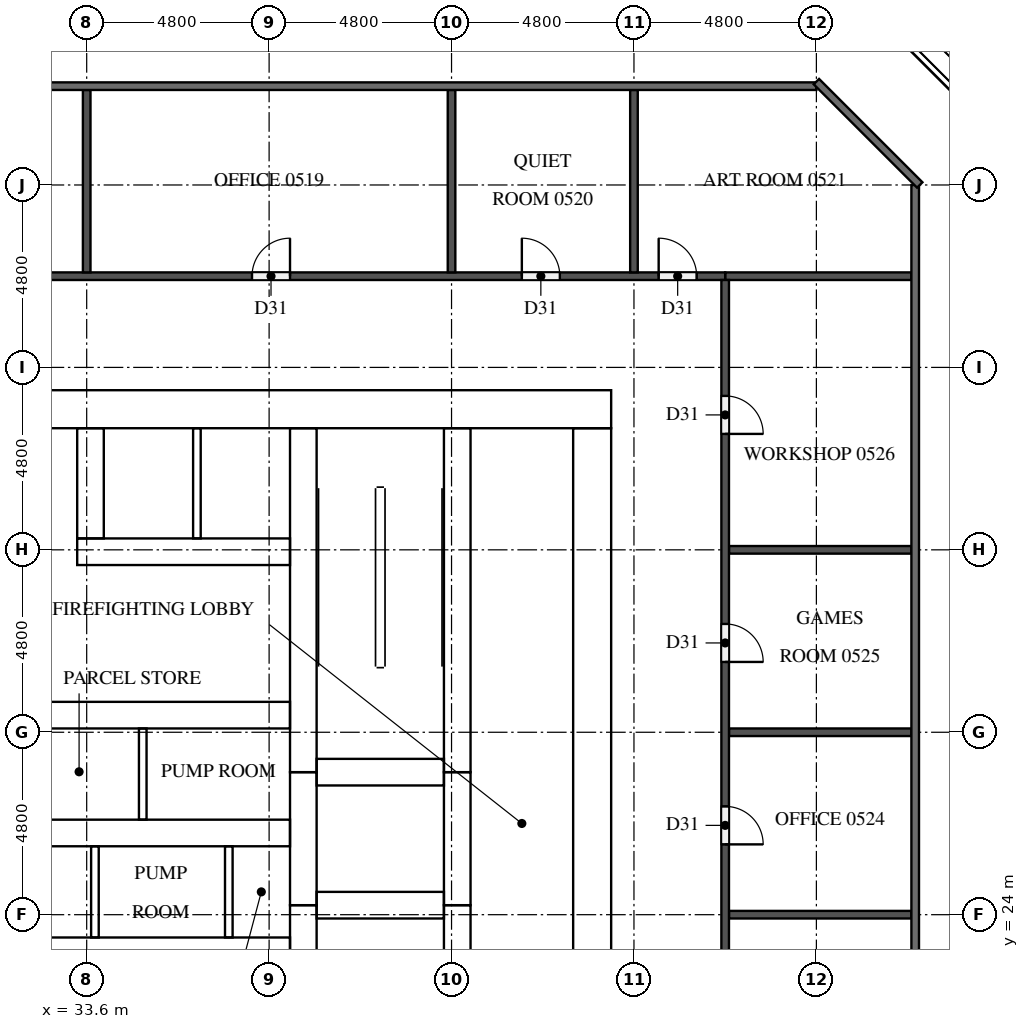
"""IFC4 building model, lengths in metres.
Left out: names, types, materials, properties, quantities, classifications, styles, units other than length and angle.
Written with IfcOpenShell. Run it as: python <this file> out.ifc"""

import sys

from ifc_helpers import new_model, si_unit, direction, frame, frame_2d, origin, place, context, subcontext, project, spatial, rectangle, extrude, element, fill, save


model = new_model("IFC4")
c1 = context("Model", 3, precision=1e-05, world=origin(), true_north=direction((0.0, 1.0)))
c2 = subcontext(c1, "Body", "Model", "MODEL_VIEW")
j1 = project(units=[si_unit("LENGTHUNIT", "METRE"), si_unit("PLANEANGLEUNIT", "RADIAN")], contexts=[c1])
p1 = place(None, origin())
s1 = spatial("IfcSite", under=j1, at=p1, CompositionType="ELEMENT")
p2 = place(p1, origin())
s2 = spatial("IfcBuilding", under=s1, at=p2, CompositionType="ELEMENT")
p3 = place(p2, frame((0.0, 0.0, 24.0)))
s3 = spatial("IfcBuildingStorey", under=s2, at=p3, CompositionType="ELEMENT", Elevation=24.0)
p4 = place(p3, frame((15.0, 37.3, 0.0), z_axis=(0.0, 0.0, 1.0), x_axis=(1.0, 0.0, 0.0)))
e1 = element("IfcWall", 1, at=p4, inside=s3, PredefinedType="SHEAR", context=c2, shape_type="SweptSolid", body=[
    extrude(rectangle(XDim=32.4, YDim=1.0, at=frame_2d((16.2, 0.0))), origin(), (0.0, 0.0, 1.0), 5.1),
])
p5 = place(p4, frame((15.3, 0.0, 0.0)))
e2 = element("IfcOpeningElement", 2, at=p5, cuts=e1, PredefinedType="OPENING", context=c2, shape_type="SweptSolid", body=[
    extrude(rectangle(XDim=1.8, YDim=2.1, at=frame_2d((0.9, 1.05))), frame((0.0, 0.51, 0.0), z_axis=(0.0, -1.0, 0.0), x_axis=(1.0, 0.0, 0.0)), (0.0, 0.0, 1.0), 1.02),
])
p6 = place(p4, frame((1.766, 0.0, 0.0)))
e3 = element("IfcOpeningElement", 3, at=p6, cuts=e1, PredefinedType="OPENING", context=c2, shape_type="SweptSolid", body=[
    extrude(rectangle(XDim=1.0, YDim=2.1, at=frame_2d((0.5, 1.05))), frame((0.0, 0.51, 0.0), z_axis=(0.0, -1.0, 0.0), x_axis=(1.0, 0.0, 0.0)), (0.0, 0.0, 1.0), 1.02),
])
p7 = place(p4, frame((5.241, 0.0, 0.0)))
e4 = element("IfcOpeningElement", 4, at=p7, cuts=e1, PredefinedType="OPENING", context=c2, shape_type="SweptSolid", body=[
    extrude(rectangle(XDim=1.0, YDim=2.1, at=frame_2d((0.5, 1.05))), frame((0.0, 0.51, 0.0), z_axis=(0.0, -1.0, 0.0), x_axis=(1.0, 0.0, 0.0)), (0.0, 0.0, 1.0), 1.02),
])
p8 = place(p3, frame((46.9, 16.0, 0.0), z_axis=(0.0, 0.0, 1.0), x_axis=(0.0, 1.0, 0.0)))
e5 = element("IfcWall", 5, at=p8, inside=s3, PredefinedType="SHEAR", context=c2, shape_type="SweptSolid", body=[
    extrude(rectangle(XDim=20.8, YDim=1.0, at=frame_2d((10.4, 0.0))), origin(), (0.0, 0.0, 1.0), 5.1),
])
p9 = place(p8, frame((10.1, 0.0, 0.0)))
e6 = element("IfcOpeningElement", 6, at=p9, cuts=e5, PredefinedType="OPENING", context=c2, shape_type="SweptSolid", body=[
    extrude(rectangle(XDim=1.2, YDim=2.1, at=frame_2d((0.6, 1.05))), frame((0.0, 0.51, 0.0), z_axis=(0.0, -1.0, 0.0), x_axis=(1.0, 0.0, 0.0)), (0.0, 0.0, 1.0), 1.02),
])
p10 = place(p3, frame((39.3, 16.0, 0.0), z_axis=(0.0, 0.0, 1.0), x_axis=(0.0, 1.0, 0.0)))
e7 = element("IfcWall", 7, at=p10, inside=s3, PredefinedType="SHEAR", context=c2, shape_type="SweptSolid", body=[
    extrude(rectangle(XDim=8.25, YDim=0.7, at=frame_2d((4.125, 0.0))), origin(), (0.0, 0.0, 1.0), 5.1),
])
p11 = place(p3, frame((39.3, 24.25, 0.0), z_axis=(0.0, 0.0, 1.0), x_axis=(0.0, 1.0, 0.0)))
e8 = element("IfcWall", 8, at=p11, inside=s3, PredefinedType="SHEAR", context=c2, shape_type="SweptSolid", body=[
    extrude(rectangle(XDim=3.5, YDim=0.7, at=frame_2d((1.75, 0.0))), origin(), (0.0, 0.0, 1.0), 5.1),
])
p12 = place(p3, frame((39.3, 27.75, 0.0), z_axis=(0.0, 0.0, 1.0), x_axis=(0.0, 1.0, 0.0)))
e9 = element("IfcWall", 9, at=p12, inside=s3, PredefinedType="SHEAR", context=c2, shape_type="SweptSolid", body=[
    extrude(rectangle(XDim=9.05, YDim=0.7, at=frame_2d((4.525, 0.0))), origin(), (0.0, 0.0, 1.0), 5.1),
])
p13 = place(p3, frame((43.35, 16.0, 0.0), z_axis=(0.0, 0.0, 1.0), x_axis=(0.0, 1.0, 0.0)))
e10 = element("IfcWall", 10, at=p13, inside=s3, PredefinedType="SHEAR", context=c2, shape_type="SweptSolid", body=[
    extrude(rectangle(XDim=8.25, YDim=0.7, at=frame_2d((4.125, 0.0))), origin(), (0.0, 0.0, 1.0), 5.1),
])
p14 = place(p13, frame((0.2, 0.0, 0.0)))
e11 = element("IfcOpeningElement", 11, at=p14, cuts=e10, PredefinedType="OPENING", context=c2, shape_type="SweptSolid", body=[
    extrude(rectangle(XDim=1.2, YDim=2.1, at=frame_2d((0.6, 1.05))), frame((0.0, 0.36, 0.0), z_axis=(0.0, -1.0, 0.0), x_axis=(1.0, 0.0, 0.0)), (0.0, 0.0, 1.0), 0.72),
])
p15 = place(p3, frame((43.35, 24.25, 0.0), z_axis=(0.0, 0.0, 1.0), x_axis=(0.0, 1.0, 0.0)))
e12 = element("IfcWall", 12, at=p15, inside=s3, PredefinedType="SHEAR", context=c2, shape_type="SweptSolid", body=[
    extrude(rectangle(XDim=3.5, YDim=0.7, at=frame_2d((1.75, 0.0))), origin(), (0.0, 0.0, 1.0), 5.1),
])
p16 = place(p15, frame((1.2, 0.0, 0.0)))
e13 = element("IfcOpeningElement", 13, at=p16, cuts=e12, PredefinedType="OPENING", context=c2, shape_type="SweptSolid", body=[
    extrude(rectangle(XDim=1.1, YDim=2.1, at=frame_2d((0.55, 1.05))), frame((0.0, 0.36, 0.0), z_axis=(0.0, -1.0, 0.0), x_axis=(1.0, 0.0, 0.0)), (0.0, 0.0, 1.0), 0.72),
])
p17 = place(p3, frame((43.35, 27.75, 0.0), z_axis=(0.0, 0.0, 1.0), x_axis=(0.0, 1.0, 0.0)))
e14 = element("IfcWall", 14, at=p17, inside=s3, PredefinedType="SHEAR", context=c2, shape_type="SweptSolid", body=[
    extrude(rectangle(XDim=9.05, YDim=0.7, at=frame_2d((4.525, 0.0))), origin(), (0.0, 0.0, 1.0), 5.1),
])
p18 = place(p17, frame((7.65, 0.0, 0.0)))
e15 = element("IfcOpeningElement", 15, at=p18, cuts=e14, PredefinedType="OPENING", context=c2, shape_type="SweptSolid", body=[
    extrude(rectangle(XDim=1.2, YDim=2.1, at=frame_2d((0.6, 1.05))), frame((0.0, 0.36, 0.0), z_axis=(0.0, -1.0, 0.0), x_axis=(1.0, 0.0, 0.0)), (0.0, 0.0, 1.0), 0.72),
])
for number, where, z_axis, x_axis in (
    (16, (39.65, 24.25, 0.0), (0.0, 0.0, 1.0), (1.0, 0.0, 0.0)),
    (17, (39.65, 27.75, 0.0), (0.0, 0.0, 1.0), (1.0, 0.0, 0.0)),
):
    element("IfcWall", number, at=place(p3, frame(where, z_axis=z_axis, x_axis=x_axis)), inside=s3, PredefinedType="SHEAR", context=c2, shape_type="SweptSolid", body=[
        extrude(rectangle(XDim=3.35, YDim=0.7, at=frame_2d((1.675, 0.0))), origin(), (0.0, 0.0, 1.0), 5.1),
    ])
p19 = place(p3, frame((23.45, 23.05, 0.0), z_axis=(0.0, 0.0, 1.0), x_axis=(1.0, 0.0, 0.0)))
e18 = element("IfcWall", 18, at=p19, inside=s3, PredefinedType="SHEAR", context=c2, shape_type="SweptSolid", body=[
    extrude(rectangle(XDim=15.5, YDim=0.7, at=frame_2d((7.75, 0.0))), origin(), (0.0, 0.0, 1.0), 5.1),
])
p20 = place(p19, frame((0.658, 0.0, 0.0)))
e19 = element("IfcOpeningElement", 19, at=p20, cuts=e18, PredefinedType="OPENING", context=c2, shape_type="SweptSolid", body=[
    extrude(rectangle(XDim=1.1, YDim=2.1, at=frame_2d((0.55, 1.05))), frame((0.0, 0.36, 0.0), z_axis=(0.0, -1.0, 0.0), x_axis=(1.0, 0.0, 0.0)), (0.0, 0.0, 1.0), 0.72),
])
p21 = place(p19, frame((3.275, 0.0, 0.0)))
e20 = element("IfcOpeningElement", 20, at=p21, cuts=e18, PredefinedType="OPENING", context=c2, shape_type="SweptSolid", body=[
    extrude(rectangle(XDim=1.1, YDim=2.1, at=frame_2d((0.55, 1.05))), frame((0.0, 0.36, 0.0), z_axis=(0.0, -1.0, 0.0), x_axis=(1.0, 0.0, 0.0)), (0.0, 0.0, 1.0), 0.72),
])
p22 = place(p19, frame((11.628, 0.0, 0.0)))
e21 = element("IfcOpeningElement", 21, at=p22, cuts=e18, PredefinedType="OPENING", context=c2, shape_type="SweptSolid", body=[
    extrude(rectangle(XDim=1.0, YDim=2.1, at=frame_2d((0.5, 1.05))), frame((0.0, 0.36, 0.0), z_axis=(0.0, -1.0, 0.0), x_axis=(1.0, 0.0, 0.0)), (0.0, 0.0, 1.0), 0.72),
])
p23 = place(p19, frame((14.245, 0.0, 0.0)))
e22 = element("IfcOpeningElement", 22, at=p23, cuts=e18, PredefinedType="OPENING", context=c2, shape_type="SweptSolid", body=[
    extrude(rectangle(XDim=1.0, YDim=2.1, at=frame_2d((0.5, 1.05))), frame((0.0, 0.36, 0.0), z_axis=(0.0, -1.0, 0.0), x_axis=(1.0, 0.0, 0.0)), (0.0, 0.0, 1.0), 0.72),
])
p24 = place(p3, frame((23.45, 26.15, 0.0), z_axis=(0.0, 0.0, 1.0), x_axis=(1.0, 0.0, 0.0)))
e23 = element("IfcWall", 23, at=p24, inside=s3, PredefinedType="SHEAR", context=c2, shape_type="SweptSolid", body=[
    extrude(rectangle(XDim=15.5, YDim=0.7, at=frame_2d((7.75, 0.0))), origin(), (0.0, 0.0, 1.0), 5.1),
])
p25 = place(p3, frame((23.45, 29.25, 0.0), z_axis=(0.0, 0.0, 1.0), x_axis=(1.0, 0.0, 0.0)))
e24 = element("IfcWall", 24, at=p25, inside=s3, PredefinedType="SHEAR", context=c2, shape_type="SweptSolid", body=[
    extrude(rectangle(XDim=15.5, YDim=0.7, at=frame_2d((7.75, 0.0))), origin(), (0.0, 0.0, 1.0), 5.1),
])
p26 = place(p25, frame((1.387, 0.0, 0.0)))
e25 = element("IfcOpeningElement", 25, at=p26, cuts=e24, PredefinedType="OPENING", context=c2, shape_type="SweptSolid", body=[
    extrude(rectangle(XDim=1.0, YDim=2.1, at=frame_2d((0.5, 1.05))), frame((0.0, 0.36, 0.0), z_axis=(0.0, -1.0, 0.0), x_axis=(1.0, 0.0, 0.0)), (0.0, 0.0, 1.0), 0.72),
])
p27 = place(p25, frame((5.312, 0.0, 0.0)))
e26 = element("IfcOpeningElement", 26, at=p27, cuts=e24, PredefinedType="OPENING", context=c2, shape_type="SweptSolid", body=[
    extrude(rectangle(XDim=1.0, YDim=2.1, at=frame_2d((0.5, 1.05))), frame((0.0, 0.36, 0.0), z_axis=(0.0, -1.0, 0.0), x_axis=(1.0, 0.0, 0.0)), (0.0, 0.0, 1.0), 0.72),
])
p28 = place(p25, frame((9.188, 0.0, 0.0)))
e27 = element("IfcOpeningElement", 27, at=p28, cuts=e24, PredefinedType="OPENING", context=c2, shape_type="SweptSolid", body=[
    extrude(rectangle(XDim=1.0, YDim=2.1, at=frame_2d((0.5, 1.05))), frame((0.0, 0.36, 0.0), z_axis=(0.0, -1.0, 0.0), x_axis=(1.0, 0.0, 0.0)), (0.0, 0.0, 1.0), 0.72),
])
p29 = place(p25, frame((13.113, 0.0, 0.0)))
e28 = element("IfcOpeningElement", 28, at=p29, cuts=e24, PredefinedType="OPENING", context=c2, shape_type="SweptSolid", body=[
    extrude(rectangle(XDim=1.0, YDim=2.1, at=frame_2d((0.5, 1.05))), frame((0.0, 0.36, 0.0), z_axis=(0.0, -1.0, 0.0), x_axis=(1.0, 0.0, 0.0)), (0.0, 0.0, 1.0), 0.72),
])
p30 = place(p3, frame((33.35, 33.55, 0.0), z_axis=(0.0, 0.0, 1.0), x_axis=(1.0, 0.0, 0.0)))
e29 = element("IfcWall", 29, at=p30, inside=s3, PredefinedType="SHEAR", context=c2, shape_type="SweptSolid", body=[
    extrude(rectangle(XDim=5.6, YDim=0.7, at=frame_2d((2.8, 0.0))), origin(), (0.0, 0.0, 1.0), 5.1),
])
p31 = place(p3, frame((33.7, 33.9, 0.0), z_axis=(0.0, 0.0, 1.0), x_axis=(0.0, 1.0, 0.0)))
e30 = element("IfcWall", 30, at=p31, inside=s3, PredefinedType="SHEAR", context=c2, shape_type="SweptSolid", body=[
    extrude(rectangle(XDim=2.9, YDim=0.7, at=frame_2d((1.45, 0.0))), origin(), (0.0, 0.0, 1.0), 5.1),
])
p32 = place(p3, frame((33.817, 23.4, 0.0), z_axis=(0.0, 0.0, 1.0), x_axis=(0.0, 1.0, 0.0)))
e31 = element("IfcWall", 31, at=p32, inside=s3, PredefinedType="SOLIDWALL", context=c2, shape_type="SweptSolid", body=[
    extrude(rectangle(XDim=2.4, YDim=0.2, at=frame_2d((1.2, 0.0))), origin(), (0.0, 0.0, 1.0), 5.1),
])
p33 = place(p3, frame((36.5, 33.9, 0.0), z_axis=(0.0, 0.0, 1.0), x_axis=(0.0, 1.0, 0.0)))
e32 = element("IfcWall", 32, at=p33, inside=s3, PredefinedType="SOLIDWALL", context=c2, shape_type="SweptSolid", body=[
    extrude(rectangle(XDim=2.9, YDim=0.2, at=frame_2d((1.45, 0.0))), origin(), (0.0, 0.0, 1.0), 5.1),
])
p34 = place(p3, frame((37.339, 23.4, 0.0), z_axis=(0.0, 0.0, 1.0), x_axis=(0.0, 1.0, 0.0)))
e33 = element("IfcWall", 33, at=p34, inside=s3, PredefinedType="PARTITIONING", context=c2, shape_type="SweptSolid", body=[
    extrude(rectangle(XDim=2.4, YDim=0.2, at=frame_2d((1.2, 0.0))), origin(), (0.0, 0.0, 1.0), 5.1),
])
p35 = place(p3, frame((35.075, 26.5, 0.0), z_axis=(0.0, 0.0, 1.0), x_axis=(0.0, 1.0, 0.0)))
e34 = element("IfcWall", 34, at=p35, inside=s3, PredefinedType="PARTITIONING", context=c2, shape_type="SweptSolid", body=[
    extrude(rectangle(XDim=2.4, YDim=0.2, at=frame_2d((1.2, 0.0))), origin(), (0.0, 0.0, 1.0), 5.1),
])
for number, where, z_axis, x_axis in (
    (35, (50.5, 24.0, 0.0), (0.0, 0.0, 1.0), (1.0, 0.0, 0.0)),
    (36, (50.5, 28.8, 0.0), (0.0, 0.0, 1.0), (1.0, 0.0, 0.0)),
    (37, (50.5, 33.6, 0.0), (0.0, 0.0, 1.0), (1.0, 0.0, 0.0)),
):
    element("IfcWall", number, at=place(p3, frame(where, z_axis=z_axis, x_axis=x_axis)), inside=s3, PredefinedType="PARTITIONING", context=c2, shape_type="SweptSolid", body=[
        extrude(rectangle(XDim=4.8, YDim=0.2, at=frame_2d((2.4, 0.0))), origin(), (0.0, 0.0, 1.0), 5.1),
    ])
p36 = place(p3, frame((50.4, 40.8, 0.0), z_axis=(0.0, 0.0, 1.0), x_axis=(1.0, 0.0, 0.0)))
e38 = element("IfcWall", 38, at=p36, inside=s3, PredefinedType="PARTITIONING", context=c2, shape_type="SweptSolid", body=[
    extrude(rectangle(XDim=4.9, YDim=0.2, at=frame_2d((2.45, 0.0))), origin(), (0.0, 0.0, 1.0), 5.1),
])
p37 = place(p3, frame((28.8, 40.8, 0.0), z_axis=(0.0, 0.0, 1.0), x_axis=(1.0, 0.0, 0.0)))
e39 = element("IfcWall", 39, at=p37, inside=s3, PredefinedType="PARTITIONING", context=c2, shape_type="SweptSolid", body=[
    extrude(rectangle(XDim=21.6, YDim=0.2, at=frame_2d((10.8, 0.0))), origin(), (0.0, 0.0, 1.0), 5.1),
])
p38 = place(p37, frame((1.95, 0.0, 0.0)))
e40 = element("IfcOpeningElement", 40, at=p38, cuts=e39, PredefinedType="OPENING", context=c2, shape_type="SweptSolid", body=[
    extrude(rectangle(XDim=1.0, YDim=2.1, at=frame_2d((0.5, 1.05))), frame((0.0, 0.11, 0.0), z_axis=(0.0, -1.0, 0.0), x_axis=(1.0, 0.0, 0.0)), (0.0, 0.0, 1.0), 0.22),
])
p39 = place(p37, frame((9.15, 0.0, 0.0)))
e41 = element("IfcOpeningElement", 41, at=p39, cuts=e39, PredefinedType="OPENING", context=c2, shape_type="SweptSolid", body=[
    extrude(rectangle(XDim=1.0, YDim=2.1, at=frame_2d((0.5, 1.05))), frame((0.0, 0.11, 0.0), z_axis=(0.0, -1.0, 0.0), x_axis=(1.0, 0.0, 0.0)), (0.0, 0.0, 1.0), 0.22),
])
p40 = place(p37, frame((16.25, 0.0, 0.0)))
e42 = element("IfcOpeningElement", 42, at=p40, cuts=e39, PredefinedType="OPENING", context=c2, shape_type="SweptSolid", body=[
    extrude(rectangle(XDim=1.0, YDim=2.1, at=frame_2d((0.5, 1.05))), frame((0.0, 0.11, 0.0), z_axis=(0.0, -1.0, 0.0), x_axis=(1.0, 0.0, 0.0)), (0.0, 0.0, 1.0), 0.22),
])
p41 = place(p37, frame((19.85, 0.0, 0.0)))
e43 = element("IfcOpeningElement", 43, at=p41, cuts=e39, PredefinedType="OPENING", context=c2, shape_type="SweptSolid", body=[
    extrude(rectangle(XDim=1.0, YDim=2.1, at=frame_2d((0.5, 1.05))), frame((0.0, 0.11, 0.0), z_axis=(0.0, -1.0, 0.0), x_axis=(1.0, 0.0, 0.0)), (0.0, 0.0, 1.0), 0.22),
])
for number, where, z_axis, x_axis in (
    (44, (33.6, 40.9, 0.0), (0.0, 0.0, 1.0), (0.0, 1.0, 0.0)),
    (45, (43.2, 40.9, 0.0), (0.0, 0.0, 1.0), (0.0, 1.0, 0.0)),
    (46, (48.0, 40.9, 0.0), (0.0, 0.0, 1.0), (0.0, 1.0, 0.0)),
):
    element("IfcWall", number, at=place(p3, frame(where, z_axis=z_axis, x_axis=x_axis)), inside=s3, PredefinedType="PARTITIONING", context=c2, shape_type="SweptSolid", body=[
        extrude(rectangle(XDim=4.8, YDim=0.2, at=frame_2d((2.4, 0.0))), origin(), (0.0, 0.0, 1.0), 5.1),
    ])
p42 = place(p3, frame((50.4, 40.7, 0.0), z_axis=(0.0, 0.0, 1.0), x_axis=(0.0, -1.0, 0.0)))
e47 = element("IfcWall", 47, at=p42, inside=s3, PredefinedType="PARTITIONING", context=c2, shape_type="SweptSolid", body=[
    extrude(rectangle(XDim=28.6, YDim=0.2, at=frame_2d((14.3, 0.0))), origin(), (0.0, 0.0, 1.0), 5.1),
])
p43 = place(p42, frame((24.55, 0.0, 0.0)))
e48 = element("IfcOpeningElement", 48, at=p43, cuts=e47, PredefinedType="OPENING", context=c2, shape_type="SweptSolid", body=[
    extrude(rectangle(XDim=1.0, YDim=2.1, at=frame_2d((0.5, 1.05))), frame((0.0, 0.11, 0.0), z_axis=(0.0, -1.0, 0.0), x_axis=(1.0, 0.0, 0.0)), (0.0, 0.0, 1.0), 0.22),
])
p44 = place(p42, frame((18.65, 0.0, 0.0)))
e49 = element("IfcOpeningElement", 49, at=p44, cuts=e47, PredefinedType="OPENING", context=c2, shape_type="SweptSolid", body=[
    extrude(rectangle(XDim=1.0, YDim=2.1, at=frame_2d((0.5, 1.05))), frame((0.0, 0.11, 0.0), z_axis=(0.0, -1.0, 0.0), x_axis=(1.0, 0.0, 0.0)), (0.0, 0.0, 1.0), 0.22),
])
p45 = place(p42, frame((13.85, 0.0, 0.0)))
e50 = element("IfcOpeningElement", 50, at=p45, cuts=e47, PredefinedType="OPENING", context=c2, shape_type="SweptSolid", body=[
    extrude(rectangle(XDim=1.0, YDim=2.1, at=frame_2d((0.5, 1.05))), frame((0.0, 0.11, 0.0), z_axis=(0.0, -1.0, 0.0), x_axis=(1.0, 0.0, 0.0)), (0.0, 0.0, 1.0), 0.22),
])
p46 = place(p42, frame((9.05, 0.0, 0.0)))
e51 = element("IfcOpeningElement", 51, at=p46, cuts=e47, PredefinedType="OPENING", context=c2, shape_type="SweptSolid", body=[
    extrude(rectangle(XDim=1.0, YDim=2.1, at=frame_2d((0.5, 1.05))), frame((0.0, 0.11, 0.0), z_axis=(0.0, -1.0, 0.0), x_axis=(1.0, 0.0, 0.0)), (0.0, 0.0, 1.0), 0.22),
])
p47 = place(p42, frame((3.05, 0.0, 0.0)))
e52 = element("IfcOpeningElement", 52, at=p47, cuts=e47, PredefinedType="OPENING", context=c2, shape_type="SweptSolid", body=[
    extrude(rectangle(XDim=1.0, YDim=2.1, at=frame_2d((0.5, 1.05))), frame((0.0, 0.11, 0.0), z_axis=(0.0, -1.0, 0.0), x_axis=(1.0, 0.0, 0.0)), (0.0, 0.0, 1.0), 0.22),
])
p48 = place(p16, origin())
e53 = element("IfcDoor", 53, at=p48, inside=s3, OperationType="DOUBLE_DOOR_SLIDING", PredefinedType="DOOR", context=c2, shape_type="SweptSolid", body=[
    extrude(rectangle(XDim=1.1, YDim=2.1, at=frame_2d((0.55, 1.05))), frame((0.0, 0.025, 0.0), z_axis=(0.0, -1.0, 0.0), x_axis=(1.0, 0.0, 0.0)), (0.0, 0.0, 1.0), 0.05),
])
fill(e13, e53)
p49 = place(p18, origin())
e54 = element("IfcDoor", 54, at=p49, inside=s3, OperationType="SINGLE_SWING_LEFT", PredefinedType="DOOR", context=c2, shape_type="SweptSolid", body=[
    extrude(rectangle(XDim=1.2, YDim=2.1, at=frame_2d((0.6, 1.05))), frame((0.0, 0.025, 0.0), z_axis=(0.0, -1.0, 0.0), x_axis=(1.0, 0.0, 0.0)), (0.0, 0.0, 1.0), 0.05),
])
fill(e15, e54)
p50 = place(p9, origin())
e55 = element("IfcDoor", 55, at=p50, inside=s3, OperationType="SINGLE_SWING_LEFT", PredefinedType="DOOR", context=c2, shape_type="SweptSolid", body=[
    extrude(rectangle(XDim=1.2, YDim=2.1, at=frame_2d((0.6, 1.05))), frame((0.0, 0.025, 0.0), z_axis=(0.0, -1.0, 0.0), x_axis=(1.0, 0.0, 0.0)), (0.0, 0.0, 1.0), 0.05),
])
fill(e6, e55)
p51 = place(p28, origin())
e56 = element("IfcDoor", 56, at=p51, inside=s3, OperationType="SINGLE_SWING_RIGHT", PredefinedType="DOOR", context=c2, shape_type="SweptSolid", body=[
    extrude(rectangle(XDim=1.0, YDim=2.1, at=frame_2d((0.5, 1.05))), frame((0.0, 0.025, 0.0), z_axis=(0.0, -1.0, 0.0), x_axis=(1.0, 0.0, 0.0)), (0.0, 0.0, 1.0), 0.05),
])
fill(e27, e56)
p52 = place(p29, origin())
e57 = element("IfcDoor", 57, at=p52, inside=s3, OperationType="SINGLE_SWING_LEFT", PredefinedType="DOOR", context=c2, shape_type="SweptSolid", body=[
    extrude(rectangle(XDim=1.0, YDim=2.1, at=frame_2d((0.5, 1.05))), frame((0.0, 0.025, 0.0), z_axis=(0.0, -1.0, 0.0), x_axis=(1.0, 0.0, 0.0)), (0.0, 0.0, 1.0), 0.05),
])
fill(e28, e57)
p53 = place(p39, origin())
e58 = element("IfcDoor", 58, at=p53, inside=s3, OperationType="SINGLE_SWING_RIGHT", PredefinedType="DOOR", context=c2, shape_type="SweptSolid", body=[
    extrude(rectangle(XDim=1.0, YDim=2.1, at=frame_2d((0.5, 1.05))), frame((0.0, 0.025, 0.0), z_axis=(0.0, -1.0, 0.0), x_axis=(1.0, 0.0, 0.0)), (0.0, 0.0, 1.0), 0.05),
])
fill(e41, e58)
p54 = place(p40, origin())
e59 = element("IfcDoor", 59, at=p54, inside=s3, OperationType="SINGLE_SWING_LEFT", PredefinedType="DOOR", context=c2, shape_type="SweptSolid", body=[
    extrude(rectangle(XDim=1.0, YDim=2.1, at=frame_2d((0.5, 1.05))), frame((0.0, 0.025, 0.0), z_axis=(0.0, -1.0, 0.0), x_axis=(1.0, 0.0, 0.0)), (0.0, 0.0, 1.0), 0.05),
])
fill(e42, e59)
p55 = place(p41, origin())
e60 = element("IfcDoor", 60, at=p55, inside=s3, OperationType="SINGLE_SWING_LEFT", PredefinedType="DOOR", context=c2, shape_type="SweptSolid", body=[
    extrude(rectangle(XDim=1.0, YDim=2.1, at=frame_2d((0.5, 1.05))), frame((0.0, 0.025, 0.0), z_axis=(0.0, -1.0, 0.0), x_axis=(1.0, 0.0, 0.0)), (0.0, 0.0, 1.0), 0.05),
])
fill(e43, e60)
p56 = place(p45, origin())
e61 = element("IfcDoor", 61, at=p56, inside=s3, OperationType="SINGLE_SWING_RIGHT", PredefinedType="DOOR", context=c2, shape_type="SweptSolid", body=[
    extrude(rectangle(XDim=1.0, YDim=2.1, at=frame_2d((0.5, 1.05))), frame((0.0, 0.025, 0.0), z_axis=(0.0, -1.0, 0.0), x_axis=(1.0, 0.0, 0.0)), (0.0, 0.0, 1.0), 0.05),
])
fill(e50, e61)
p57 = place(p46, origin())
e62 = element("IfcDoor", 62, at=p57, inside=s3, OperationType="SINGLE_SWING_RIGHT", PredefinedType="DOOR", context=c2, shape_type="SweptSolid", body=[
    extrude(rectangle(XDim=1.0, YDim=2.1, at=frame_2d((0.5, 1.05))), frame((0.0, 0.025, 0.0), z_axis=(0.0, -1.0, 0.0), x_axis=(1.0, 0.0, 0.0)), (0.0, 0.0, 1.0), 0.05),
])
fill(e51, e62)
p58 = place(p47, origin())
e63 = element("IfcDoor", 63, at=p58, inside=s3, OperationType="SINGLE_SWING_RIGHT", PredefinedType="DOOR", context=c2, shape_type="SweptSolid", body=[
    extrude(rectangle(XDim=1.0, YDim=2.1, at=frame_2d((0.5, 1.05))), frame((0.0, 0.025, 0.0), z_axis=(0.0, -1.0, 0.0), x_axis=(1.0, 0.0, 0.0)), (0.0, 0.0, 1.0), 0.05),
])
fill(e52, e63)
save(model, sys.argv[1])
